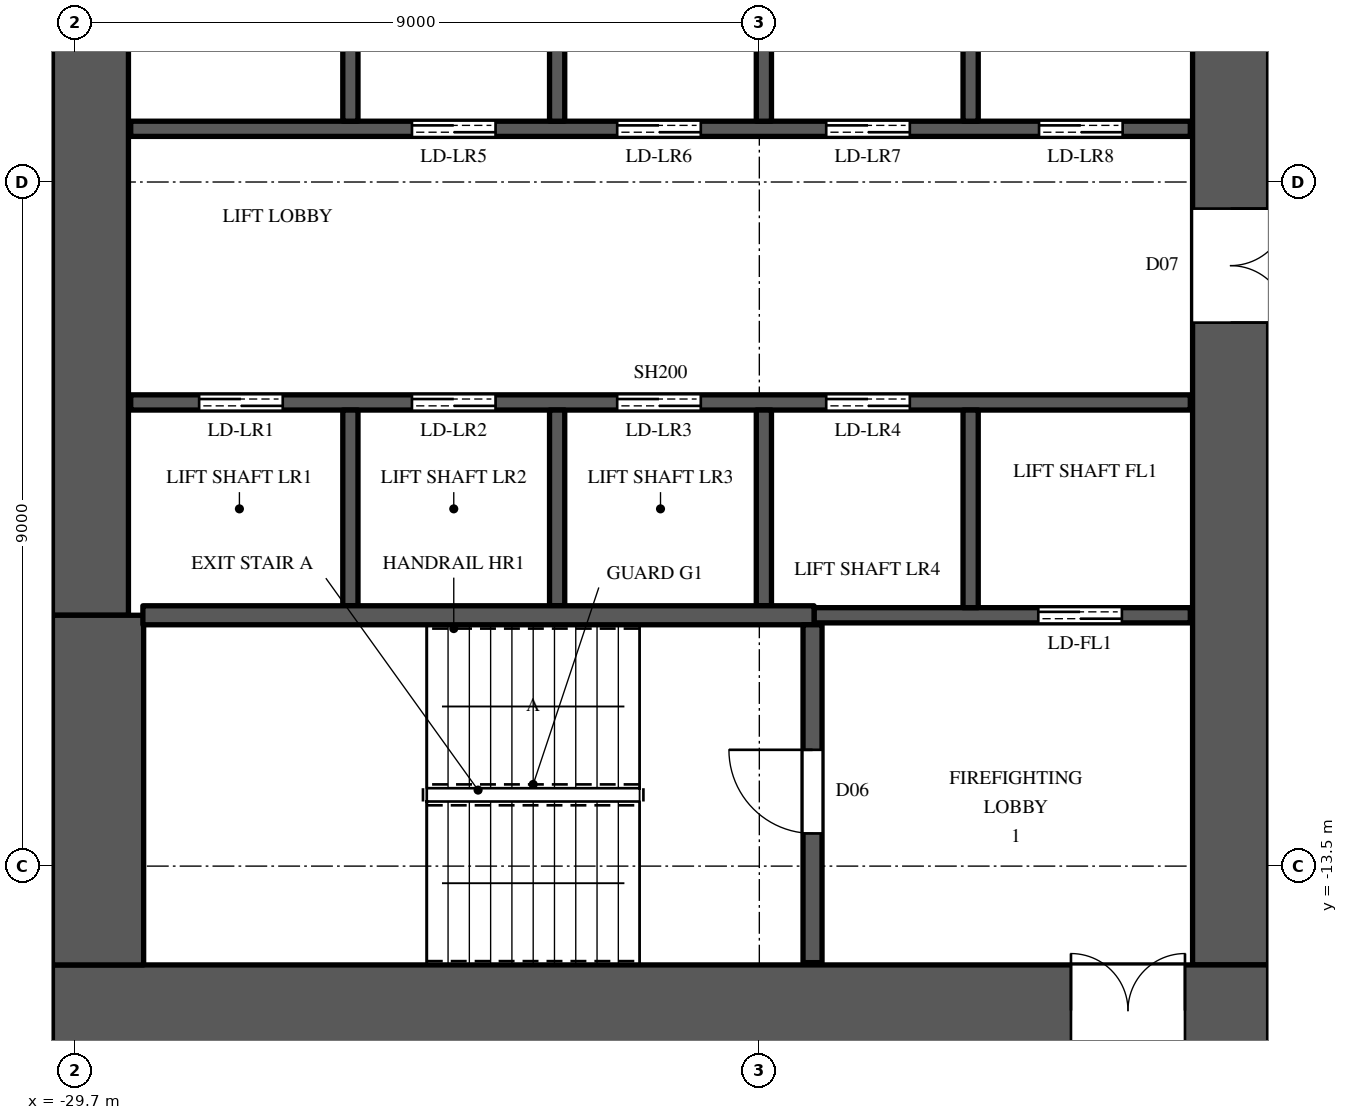
"""IFC4 building model, lengths in metres.
Left out: names, types, materials, properties, quantities, classifications, styles, units other than length and angle.
Written with IfcOpenShell. Run it as: python <this file> out.ifc"""

import sys

from ifc_helpers import new_model, si_unit, direction, frame, frame_2d, origin, place, context, subcontext, project, spatial, rectangle, extrude, element, fill, save


model = new_model("IFC4")
c1 = context("Model", 3, precision=1e-05, world=origin(), true_north=direction((0.0, 1.0)))
c2 = subcontext(c1, "Body", "Model", "MODEL_VIEW")
j1 = project(units=[si_unit("LENGTHUNIT", "METRE"), si_unit("PLANEANGLEUNIT", "RADIAN")], contexts=[c1])
p1 = place(None, origin())
s1 = spatial("IfcSite", under=j1, at=p1, CompositionType="ELEMENT")
p2 = place(p1, origin())
s2 = spatial("IfcBuilding", under=s1, at=p2, CompositionType="ELEMENT")
p3 = place(p2, frame((0.0, 0.0, 134.7)))
s3 = spatial("IfcBuildingStorey", under=s2, at=p3, CompositionType="ELEMENT", Elevation=134.7)
p4 = place(p3, frame((-30.0, -15.4, 0.0), z_axis=(0.0, 0.0, 1.0), x_axis=(1.0, 0.0, 0.0)))
e1 = element("IfcWall", 1, at=p4, inside=s3, PredefinedType="SHEAR", context=c2, shape_type="SweptSolid", body=[
    extrude(rectangle(XDim=16.0, YDim=1.2, at=frame_2d((8.0, 0.0))), origin(), (0.0, 0.0, 1.0), 3.6),
])
p5 = place(p4, frame((13.4, 0.0, 0.0)))
e2 = element("IfcOpeningElement", 2, at=p5, cuts=e1, PredefinedType="OPENING", context=c2, shape_type="SweptSolid", body=[
    extrude(rectangle(XDim=1.5, YDim=2.4, at=frame_2d((0.75, 1.2))), frame((0.0, 0.61, 0.0), z_axis=(0.0, -1.0, 0.0), x_axis=(1.0, 0.0, 0.0)), (0.0, 0.0, 1.0), 1.22),
])
p6 = place(p3, frame((-14.5, -14.8, 0.0), z_axis=(0.0, 0.0, 1.0), x_axis=(0.0, 1.0, 0.0)))
e3 = element("IfcWall", 3, at=p6, inside=s3, PredefinedType="SHEAR", context=c2, shape_type="SweptSolid", body=[
    extrude(rectangle(XDim=29.6, YDim=1.0, at=frame_2d((14.8, 0.0))), origin(), (0.0, 0.0, 1.0), 3.6),
])
p7 = place(p6, frame((8.45, 0.0, 0.0)))
e4 = element("IfcOpeningElement", 4, at=p7, cuts=e3, PredefinedType="OPENING", context=c2, shape_type="SweptSolid", body=[
    extrude(rectangle(XDim=1.5, YDim=2.4, at=frame_2d((0.75, 1.2))), frame((0.0, 0.51, 0.0), z_axis=(0.0, -1.0, 0.0), x_axis=(1.0, 0.0, 0.0)), (0.0, 0.0, 1.0), 1.02),
])
p8 = place(p6, frame((19.65, 0.0, 0.0)))
e5 = element("IfcOpeningElement", 5, at=p8, cuts=e3, PredefinedType="OPENING", context=c2, shape_type="SweptSolid", body=[
    extrude(rectangle(XDim=1.5, YDim=2.4, at=frame_2d((0.75, 1.2))), frame((0.0, 0.51, 0.0), z_axis=(0.0, -1.0, 0.0), x_axis=(1.0, 0.0, 0.0)), (0.0, 0.0, 1.0), 1.02),
])
p9 = place(p6, frame((14.5, 0.0, 0.0)))
e6 = element("IfcOpeningElement", 6, at=p9, cuts=e3, PredefinedType="OPENING", context=c2, shape_type="SweptSolid", body=[
    extrude(rectangle(XDim=0.6, YDim=2.0, at=frame_2d((0.3, 1.0))), frame((0.0, 0.51, 0.0), z_axis=(0.0, -1.0, 0.0), x_axis=(1.0, 0.0, 0.0)), (0.0, 0.0, 1.0), 1.02),
])
p10 = place(p3, frame((-29.5, -10.2, 0.0), z_axis=(0.0, 0.0, 1.0), x_axis=(0.0, 1.0, 0.0)))
e7 = element("IfcWall", 7, at=p10, inside=s3, PredefinedType="SHEAR", context=c2, shape_type="SweptSolid", body=[
    extrude(rectangle(XDim=20.4, YDim=1.0, at=frame_2d((10.2, 0.0))), origin(), (0.0, 0.0, 1.0), 3.6),
])
p11 = place(p3, frame((-29.4, -14.8, 0.0), z_axis=(0.0, 0.0, 1.0), x_axis=(0.0, 1.0, 0.0)))
e8 = element("IfcWall", 8, at=p11, inside=s3, PredefinedType="SHEAR", context=c2, shape_type="SweptSolid", body=[
    extrude(rectangle(XDim=4.6, YDim=1.2, at=frame_2d((2.3, 0.0))), origin(), (0.0, 0.0, 1.0), 3.6),
])
p12 = place(p3, frame((-28.97, -7.4, 0.0), z_axis=(0.0, 0.0, 1.0), x_axis=(1.0, 0.0, 0.0)))
e9 = element("IfcWall", 9, at=p12, inside=s3, PredefinedType="SHEAR", context=c2, shape_type="SweptSolid", body=[
    extrude(rectangle(XDim=13.94, YDim=0.2, at=frame_2d((6.97, 0.0))), origin(), (0.0, 0.0, 1.0), 3.3),
])
p13 = place(p12, frame((0.9, 0.0, 0.0)))
e10 = element("IfcOpeningElement", 10, at=p13, cuts=e9, PredefinedType="OPENING", context=c2, shape_type="SweptSolid", body=[
    extrude(rectangle(XDim=1.1, YDim=2.2, at=frame_2d((0.55, 1.1))), frame((0.0, 0.11, 0.0), z_axis=(0.0, -1.0, 0.0), x_axis=(1.0, 0.0, 0.0)), (0.0, 0.0, 1.0), 0.22),
])
p14 = place(p12, frame((3.7, 0.0, 0.0)))
e11 = element("IfcOpeningElement", 11, at=p14, cuts=e9, PredefinedType="OPENING", context=c2, shape_type="SweptSolid", body=[
    extrude(rectangle(XDim=1.1, YDim=2.2, at=frame_2d((0.55, 1.1))), frame((0.0, 0.11, 0.0), z_axis=(0.0, -1.0, 0.0), x_axis=(1.0, 0.0, 0.0)), (0.0, 0.0, 1.0), 0.22),
])
p15 = place(p12, frame((6.4, 0.0, 0.0)))
e12 = element("IfcOpeningElement", 12, at=p15, cuts=e9, PredefinedType="OPENING", context=c2, shape_type="SweptSolid", body=[
    extrude(rectangle(XDim=1.1, YDim=2.2, at=frame_2d((0.55, 1.1))), frame((0.0, 0.11, 0.0), z_axis=(0.0, -1.0, 0.0), x_axis=(1.0, 0.0, 0.0)), (0.0, 0.0, 1.0), 0.22),
])
p16 = place(p12, frame((9.15, 0.0, 0.0)))
e13 = element("IfcOpeningElement", 13, at=p16, cuts=e9, PredefinedType="OPENING", context=c2, shape_type="SweptSolid", body=[
    extrude(rectangle(XDim=1.1, YDim=2.2, at=frame_2d((0.55, 1.1))), frame((0.0, 0.11, 0.0), z_axis=(0.0, -1.0, 0.0), x_axis=(1.0, 0.0, 0.0)), (0.0, 0.0, 1.0), 0.22),
])
p17 = place(p3, frame((-28.97, -3.8, 0.0), z_axis=(0.0, 0.0, 1.0), x_axis=(1.0, 0.0, 0.0)))
e14 = element("IfcWall", 14, at=p17, inside=s3, PredefinedType="SHEAR", context=c2, shape_type="SweptSolid", body=[
    extrude(rectangle(XDim=13.94, YDim=0.2, at=frame_2d((6.97, 0.0))), origin(), (0.0, 0.0, 1.0), 3.3),
])
p18 = place(p17, frame((3.7, 0.0, 0.0)))
e15 = element("IfcOpeningElement", 15, at=p18, cuts=e14, PredefinedType="OPENING", context=c2, shape_type="SweptSolid", body=[
    extrude(rectangle(XDim=1.1, YDim=2.2, at=frame_2d((0.55, 1.1))), frame((0.0, 0.11, 0.0), z_axis=(0.0, -1.0, 0.0), x_axis=(1.0, 0.0, 0.0)), (0.0, 0.0, 1.0), 0.22),
])
p19 = place(p17, frame((6.4, 0.0, 0.0)))
e16 = element("IfcOpeningElement", 16, at=p19, cuts=e14, PredefinedType="OPENING", context=c2, shape_type="SweptSolid", body=[
    extrude(rectangle(XDim=1.1, YDim=2.2, at=frame_2d((0.55, 1.1))), frame((0.0, 0.11, 0.0), z_axis=(0.0, -1.0, 0.0), x_axis=(1.0, 0.0, 0.0)), (0.0, 0.0, 1.0), 0.22),
])
p20 = place(p17, frame((9.15, 0.0, 0.0)))
e17 = element("IfcOpeningElement", 17, at=p20, cuts=e14, PredefinedType="OPENING", context=c2, shape_type="SweptSolid", body=[
    extrude(rectangle(XDim=1.1, YDim=2.2, at=frame_2d((0.55, 1.1))), frame((0.0, 0.11, 0.0), z_axis=(0.0, -1.0, 0.0), x_axis=(1.0, 0.0, 0.0)), (0.0, 0.0, 1.0), 0.22),
])
p21 = place(p17, frame((11.95, 0.0, 0.0)))
e18 = element("IfcOpeningElement", 18, at=p21, cuts=e14, PredefinedType="OPENING", context=c2, shape_type="SweptSolid", body=[
    extrude(rectangle(XDim=1.1, YDim=2.2, at=frame_2d((0.55, 1.1))), frame((0.0, 0.11, 0.0), z_axis=(0.0, -1.0, 0.0), x_axis=(1.0, 0.0, 0.0)), (0.0, 0.0, 1.0), 0.22),
])
p22 = place(p3, frame((-26.08, -10.075, 0.0), z_axis=(0.0, 0.0, 1.0), x_axis=(0.0, 1.0, 0.0)))
e19 = element("IfcWall", 19, at=p22, inside=s3, PredefinedType="SHEAR", context=c2, shape_type="SweptSolid", body=[
    extrude(rectangle(XDim=2.575, YDim=0.2, at=frame_2d((1.288, 0.0))), origin(), (0.0, 0.0, 1.0), 3.6),
])
p23 = place(p3, frame((-26.08, -3.7, 0.0), z_axis=(0.0, 0.0, 1.0), x_axis=(0.0, 1.0, 0.0)))
e20 = element("IfcWall", 20, at=p23, inside=s3, PredefinedType="SHEAR", context=c2, shape_type="SweptSolid", body=[
    extrude(rectangle(XDim=2.6, YDim=0.2, at=frame_2d((1.3, 0.0))), origin(), (0.0, 0.0, 1.0), 3.6),
])
p24 = place(p3, frame((-23.36, -10.075, 0.0), z_axis=(0.0, 0.0, 1.0), x_axis=(0.0, 1.0, 0.0)))
e21 = element("IfcWall", 21, at=p24, inside=s3, PredefinedType="SHEAR", context=c2, shape_type="SweptSolid", body=[
    extrude(rectangle(XDim=2.575, YDim=0.2, at=frame_2d((1.288, 0.0))), origin(), (0.0, 0.0, 1.0), 3.6),
])
p25 = place(p3, frame((-23.36, -3.7, 0.0), z_axis=(0.0, 0.0, 1.0), x_axis=(0.0, 1.0, 0.0)))
e22 = element("IfcWall", 22, at=p25, inside=s3, PredefinedType="SHEAR", context=c2, shape_type="SweptSolid", body=[
    extrude(rectangle(XDim=2.6, YDim=0.2, at=frame_2d((1.3, 0.0))), origin(), (0.0, 0.0, 1.0), 3.6),
])
p26 = place(p3, frame((-20.64, -10.075, 0.0), z_axis=(0.0, 0.0, 1.0), x_axis=(0.0, 1.0, 0.0)))
e23 = element("IfcWall", 23, at=p26, inside=s3, PredefinedType="SHEAR", context=c2, shape_type="SweptSolid", body=[
    extrude(rectangle(XDim=2.575, YDim=0.2, at=frame_2d((1.288, 0.0))), origin(), (0.0, 0.0, 1.0), 3.6),
])
p27 = place(p3, frame((-20.64, -3.7, 0.0), z_axis=(0.0, 0.0, 1.0), x_axis=(0.0, 1.0, 0.0)))
e24 = element("IfcWall", 24, at=p27, inside=s3, PredefinedType="SHEAR", context=c2, shape_type="SweptSolid", body=[
    extrude(rectangle(XDim=2.6, YDim=0.2, at=frame_2d((1.3, 0.0))), origin(), (0.0, 0.0, 1.0), 3.6),
])
p28 = place(p3, frame((-19.98, -10.2, 0.0), z_axis=(0.0, 0.0, 1.0), x_axis=(1.0, 0.0, 0.0)))
e25 = element("IfcWall", 25, at=p28, inside=s3, PredefinedType="SHEAR", context=c2, shape_type="SweptSolid", body=[
    extrude(rectangle(XDim=4.95, YDim=0.2, at=frame_2d((2.475, 0.0))), origin(), (0.0, 0.0, 1.0), 3.3),
])
p29 = place(p28, frame((2.95, 0.0, 0.0)))
e26 = element("IfcOpeningElement", 26, at=p29, cuts=e25, PredefinedType="OPENING", context=c2, shape_type="SweptSolid", body=[
    extrude(rectangle(XDim=1.1, YDim=2.2, at=frame_2d((0.55, 1.1))), frame((0.0, 0.11, 0.0), z_axis=(0.0, -1.0, 0.0), x_axis=(1.0, 0.0, 0.0)), (0.0, 0.0, 1.0), 0.22),
])
p30 = place(p3, frame((-17.92, -10.1, 0.0), z_axis=(0.0, 0.0, 1.0), x_axis=(0.0, 1.0, 0.0)))
e27 = element("IfcWall", 27, at=p30, inside=s3, PredefinedType="SHEAR", context=c2, shape_type="SweptSolid", body=[
    extrude(rectangle(XDim=2.6, YDim=0.2, at=frame_2d((1.3, 0.0))), origin(), (0.0, 0.0, 1.0), 3.6),
])
p31 = place(p3, frame((-17.92, -3.7, 0.0), z_axis=(0.0, 0.0, 1.0), x_axis=(0.0, 1.0, 0.0)))
e28 = element("IfcWall", 28, at=p31, inside=s3, PredefinedType="SHEAR", context=c2, shape_type="SweptSolid", body=[
    extrude(rectangle(XDim=2.6, YDim=0.2, at=frame_2d((1.3, 0.0))), origin(), (0.0, 0.0, 1.0), 3.6),
])
p32 = place(p3, frame((-28.81, -10.2, 0.0), z_axis=(0.0, 0.0, 1.0), x_axis=(1.0, 0.0, 0.0)))
e29 = element("IfcWall", 29, at=p32, inside=s3, PredefinedType="SHEAR", context=c2, shape_type="SweptSolid", body=[
    extrude(rectangle(XDim=8.83, YDim=0.25, at=frame_2d((4.415, 0.0))), origin(), (0.0, 0.0, 1.0), 3.3),
])
p33 = place(p3, frame((-20.0, -14.77, 0.0), z_axis=(0.0, 0.0, 1.0), x_axis=(0.0, 1.0, 0.0)))
e30 = element("IfcWall", 30, at=p33, inside=s3, PredefinedType="SHEAR", context=c2, shape_type="SweptSolid", body=[
    extrude(rectangle(XDim=4.445, YDim=0.25, at=frame_2d((2.223, 0.0))), origin(), (0.0, 0.0, 1.0), 3.3),
])
p34 = place(p33, frame((1.7, 0.0, 0.0)))
e31 = element("IfcOpeningElement", 31, at=p34, cuts=e30, PredefinedType="OPENING", context=c2, shape_type="SweptSolid", body=[
    extrude(rectangle(XDim=1.1, YDim=2.2, at=frame_2d((0.55, 1.1))), frame((0.0, 0.135, 0.0), z_axis=(0.0, -1.0, 0.0), x_axis=(1.0, 0.0, 0.0)), (0.0, 0.0, 1.0), 0.27),
])
p35 = place(p34, origin())
e32 = element("IfcDoor", 32, at=p35, inside=s3, OperationType="SINGLE_SWING_RIGHT", PredefinedType="DOOR", context=c2, shape_type="SweptSolid", body=[
    extrude(rectangle(XDim=1.1, YDim=2.2, at=frame_2d((0.55, 1.1))), frame((0.0, 0.025, 0.0), z_axis=(0.0, -1.0, 0.0), x_axis=(1.0, 0.0, 0.0)), (0.0, 0.0, 1.0), 0.05),
])
fill(e31, e32)
p36 = place(p13, origin())
e33 = element("IfcDoor", 33, at=p36, inside=s3, OperationType="DOUBLE_DOOR_SLIDING", PredefinedType="DOOR", context=c2, shape_type="SweptSolid", body=[
    extrude(rectangle(XDim=1.1, YDim=2.2, at=frame_2d((0.55, 1.1))), frame((0.0, 0.025, 0.0), z_axis=(0.0, -1.0, 0.0), x_axis=(1.0, 0.0, 0.0)), (0.0, 0.0, 1.0), 0.05),
])
fill(e10, e33)
p37 = place(p14, origin())
e34 = element("IfcDoor", 34, at=p37, inside=s3, OperationType="DOUBLE_DOOR_SLIDING", PredefinedType="DOOR", context=c2, shape_type="SweptSolid", body=[
    extrude(rectangle(XDim=1.1, YDim=2.2, at=frame_2d((0.55, 1.1))), frame((0.0, 0.025, 0.0), z_axis=(0.0, -1.0, 0.0), x_axis=(1.0, 0.0, 0.0)), (0.0, 0.0, 1.0), 0.05),
])
fill(e11, e34)
p38 = place(p15, origin())
e35 = element("IfcDoor", 35, at=p38, inside=s3, OperationType="DOUBLE_DOOR_SLIDING", PredefinedType="DOOR", context=c2, shape_type="SweptSolid", body=[
    extrude(rectangle(XDim=1.1, YDim=2.2, at=frame_2d((0.55, 1.1))), frame((0.0, 0.025, 0.0), z_axis=(0.0, -1.0, 0.0), x_axis=(1.0, 0.0, 0.0)), (0.0, 0.0, 1.0), 0.05),
])
fill(e12, e35)
p39 = place(p16, origin())
e36 = element("IfcDoor", 36, at=p39, inside=s3, OperationType="DOUBLE_DOOR_SLIDING", PredefinedType="DOOR", context=c2, shape_type="SweptSolid", body=[
    extrude(rectangle(XDim=1.1, YDim=2.2, at=frame_2d((0.55, 1.1))), frame((0.0, 0.025, 0.0), z_axis=(0.0, -1.0, 0.0), x_axis=(1.0, 0.0, 0.0)), (0.0, 0.0, 1.0), 0.05),
])
fill(e13, e36)
p40 = place(p29, origin())
e37 = element("IfcDoor", 37, at=p40, inside=s3, OperationType="DOUBLE_DOOR_SLIDING", PredefinedType="DOOR", context=c2, shape_type="SweptSolid", body=[
    extrude(rectangle(XDim=1.1, YDim=2.2, at=frame_2d((0.55, 1.1))), frame((0.0, 0.025, 0.0), z_axis=(0.0, -1.0, 0.0), x_axis=(1.0, 0.0, 0.0)), (0.0, 0.0, 1.0), 0.05),
])
fill(e26, e37)
p41 = place(p18, origin())
e38 = element("IfcDoor", 38, at=p41, inside=s3, OperationType="DOUBLE_DOOR_SLIDING", PredefinedType="DOOR", context=c2, shape_type="SweptSolid", body=[
    extrude(rectangle(XDim=1.1, YDim=2.2, at=frame_2d((0.55, 1.1))), frame((0.0, 0.025, 0.0), z_axis=(0.0, -1.0, 0.0), x_axis=(1.0, 0.0, 0.0)), (0.0, 0.0, 1.0), 0.05),
])
fill(e15, e38)
p42 = place(p19, origin())
e39 = element("IfcDoor", 39, at=p42, inside=s3, OperationType="DOUBLE_DOOR_SLIDING", PredefinedType="DOOR", context=c2, shape_type="SweptSolid", body=[
    extrude(rectangle(XDim=1.1, YDim=2.2, at=frame_2d((0.55, 1.1))), frame((0.0, 0.025, 0.0), z_axis=(0.0, -1.0, 0.0), x_axis=(1.0, 0.0, 0.0)), (0.0, 0.0, 1.0), 0.05),
])
fill(e16, e39)
p43 = place(p20, origin())
e40 = element("IfcDoor", 40, at=p43, inside=s3, OperationType="DOUBLE_DOOR_SLIDING", PredefinedType="DOOR", context=c2, shape_type="SweptSolid", body=[
    extrude(rectangle(XDim=1.1, YDim=2.2, at=frame_2d((0.55, 1.1))), frame((0.0, 0.025, 0.0), z_axis=(0.0, -1.0, 0.0), x_axis=(1.0, 0.0, 0.0)), (0.0, 0.0, 1.0), 0.05),
])
fill(e17, e40)
p44 = place(p21, origin())
e41 = element("IfcDoor", 41, at=p44, inside=s3, OperationType="DOUBLE_DOOR_SLIDING", PredefinedType="DOOR", context=c2, shape_type="SweptSolid", body=[
    extrude(rectangle(XDim=1.1, YDim=2.2, at=frame_2d((0.55, 1.1))), frame((0.0, 0.025, 0.0), z_axis=(0.0, -1.0, 0.0), x_axis=(1.0, 0.0, 0.0)), (0.0, 0.0, 1.0), 0.05),
])
fill(e18, e41)
p45 = place(p5, origin())
e42 = element("IfcDoor", 42, at=p45, inside=s3, OperationType="DOUBLE_DOOR_SINGLE_SWING", PredefinedType="DOOR", context=c2, shape_type="SweptSolid", body=[
    extrude(rectangle(XDim=1.5, YDim=2.4, at=frame_2d((0.75, 1.2))), frame((0.0, 0.025, 0.0), z_axis=(0.0, -1.0, 0.0), x_axis=(1.0, 0.0, 0.0)), (0.0, 0.0, 1.0), 0.05),
])
fill(e2, e42)
p46 = place(p7, origin())
e43 = element("IfcDoor", 43, at=p46, inside=s3, OperationType="DOUBLE_DOOR_SINGLE_SWING", PredefinedType="DOOR", context=c2, shape_type="SweptSolid", body=[
    extrude(rectangle(XDim=1.5, YDim=2.4, at=frame_2d((0.75, 1.2))), frame((0.0, -0.445, 0.0), z_axis=(0.0, -1.0, 0.0), x_axis=(1.0, 0.0, 0.0)), (0.0, 0.0, 1.0), 0.05),
])
fill(e4, e43)
save(model, sys.argv[1])
